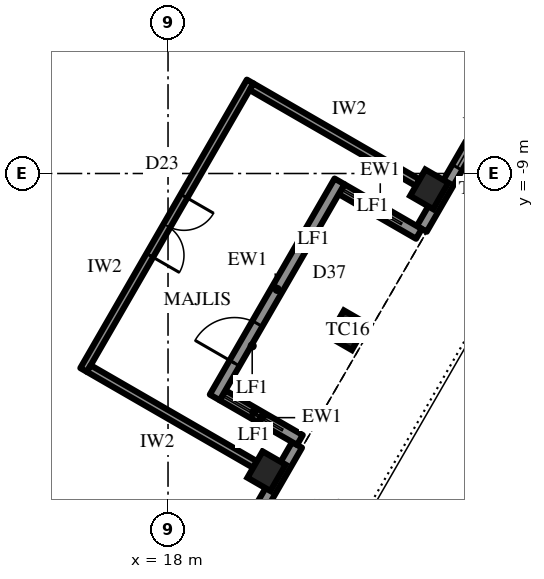
"""IFC4 building model, lengths in metres.
Left out: names, types, materials, properties, quantities, classifications, styles, units other than length and angle.
Written with IfcOpenShell. Run it as: python <this file> out.ifc"""

import sys

from ifc_helpers import new_model, si_unit, direction, frame, frame_2d, origin, origin_2d, place, context, subcontext, project, spatial, rectangle, extrude, element, fill, save


model = new_model("IFC4")
c1 = context("Model", 3, precision=1e-05, world=origin(), true_north=direction((0.0, 1.0)))
c2 = subcontext(c1, "Body", "Model", "MODEL_VIEW")
j1 = project(units=[si_unit("LENGTHUNIT", "METRE"), si_unit("PLANEANGLEUNIT", "RADIAN")], contexts=[c1])
p1 = place(None, origin())
s1 = spatial("IfcSite", under=j1, at=p1, CompositionType="ELEMENT")
p2 = place(p1, origin())
s2 = spatial("IfcBuilding", under=s1, at=p2, CompositionType="ELEMENT")
p3 = place(p2, frame((0.0, 0.0, 387.1)))
s3 = spatial("IfcBuildingStorey", under=s2, at=p3, CompositionType="ELEMENT", Elevation=387.1)
for number, where, z_axis, x_axis in (
    (1, (20.592, -16.833, 0.0), (0.0, 0.0, 1.0), (0.5, 0.866, 0.0)),
    (2, (22.733, -13.125, 0.0), (0.0, 0.0, 1.0), (0.5, 0.866, 0.0)),
    (3, (24.874, -9.417, 0.0), (0.0, 0.0, 1.0), (0.5, 0.866, 0.0)),
):
    element("IfcColumn", number, at=place(p3, frame(where, z_axis=z_axis, x_axis=x_axis)), inside=s3, PredefinedType="COLUMN", context=c2, shape_type="SweptSolid", body=[
        extrude(rectangle(XDim=0.8, YDim=0.7, at=origin_2d()), origin(), (0.0, 0.0, 1.0), 4.2),
    ])
p4 = place(p3, frame((16.613, -24.425, 0.0), z_axis=(0.0, 0.0, 1.0), x_axis=(0.499996453679, 0.866027451244, 0.0)))
e4 = element("IfcWall", 4, at=p4, inside=s3, PredefinedType="SOLIDWALL", context=c2, shape_type="SweptSolid", body=[
    extrude(rectangle(XDim=9.564, YDim=0.3, at=frame_2d((4.782, 0.0))), origin(), (0.0, 0.0, 1.0), 2.9),
])
p5 = place(p4, frame((0.866, 0.0, 0.6)))
e5 = element("IfcOpeningElement", 5, at=p5, cuts=e4, PredefinedType="OPENING", context=c2, shape_type="SweptSolid", body=[
    extrude(rectangle(XDim=2.55, YDim=2.05, at=frame_2d((1.275, 1.025))), frame((0.0, 0.16, 0.0), z_axis=(0.0, -1.0, 0.0), x_axis=(1.0, 0.0, 0.0)), (0.0, 0.0, 1.0), 0.32),
])
p6 = place(p4, frame((5.823, 0.0, 0.0)))
e6 = element("IfcOpeningElement", 6, at=p6, cuts=e4, PredefinedType="OPENING", context=c2, shape_type="SweptSolid", body=[
    extrude(rectangle(XDim=1.2, YDim=2.4, at=frame_2d((0.6, 1.2))), frame((0.0, 0.16, 0.0), z_axis=(0.0, -1.0, 0.0), x_axis=(1.0, 0.0, 0.0)), (0.0, 0.0, 1.0), 0.32),
])
p7 = place(p3, frame((24.677, -10.458, 0.0), z_axis=(0.0, 0.0, 1.0), x_axis=(0.499996453679, 0.866027451244, 0.0)))
e7 = element("IfcWall", 7, at=p7, inside=s3, PredefinedType="SOLIDWALL", context=c2, shape_type="SweptSolid", body=[
    extrude(rectangle(XDim=9.564, YDim=0.3, at=frame_2d((4.782, 0.0))), origin(), (0.0, 0.0, 1.0), 2.9),
])
p8 = place(p7, frame((1.866, 0.0, 0.6)))
e8 = element("IfcOpeningElement", 8, at=p8, cuts=e7, PredefinedType="OPENING", context=c2, shape_type="SweptSolid", body=[
    extrude(rectangle(XDim=2.55, YDim=2.05, at=frame_2d((1.275, 1.025))), frame((0.0, 0.16, 0.0), z_axis=(0.0, -1.0, 0.0), x_axis=(1.0, 0.0, 0.0)), (0.0, 0.0, 1.0), 0.32),
])
p9 = place(p7, frame((6.148, 0.0, 0.6)))
e9 = element("IfcOpeningElement", 9, at=p9, cuts=e7, PredefinedType="OPENING", context=c2, shape_type="SweptSolid", body=[
    extrude(rectangle(XDim=2.55, YDim=2.05, at=frame_2d((1.275, 1.025))), frame((0.0, 0.16, 0.0), z_axis=(0.0, -1.0, 0.0), x_axis=(1.0, 0.0, 0.0)), (0.0, 0.0, 1.0), 0.32),
])
for number, where, z_axis, x_axis in (
    (10, (21.47, -16.012, 0.0), (0.0, 0.0, 1.0), (-0.866, 0.5, 0.0)),
    (11, (24.602, -10.588, 0.0), (0.0, 0.0, 1.0), (-0.866, 0.5, 0.0)),
):
    element("IfcWall", number, at=place(p3, frame(where, z_axis=z_axis, x_axis=x_axis)), inside=s3, PredefinedType="SOLIDWALL", context=c2, shape_type="SweptSolid", body=[
        extrude(rectangle(XDim=2.35, YDim=0.3, at=frame_2d((1.175, 0.0))), origin(), (0.0, 0.0, 1.0), 2.9),
    ])
p10 = place(p3, frame((19.23, -14.892, 0.0), z_axis=(0.0, 0.0, 1.0), x_axis=(0.499999339774, 0.866025784966, 0.0)))
e12 = element("IfcWall", 12, at=p10, inside=s3, PredefinedType="SOLIDWALL", context=c2, shape_type="SweptSolid", body=[
    extrude(rectangle(XDim=6.564, YDim=0.3, at=frame_2d((3.282, 0.0))), origin(), (0.0, 0.0, 1.0), 2.9),
])
p11 = place(p10, frame((1.041, 0.0, 0.0)))
e13 = element("IfcOpeningElement", 13, at=p11, cuts=e12, PredefinedType="OPENING", context=c2, shape_type="SweptSolid", body=[
    extrude(rectangle(XDim=1.2, YDim=2.4, at=frame_2d((0.6, 1.2))), frame((0.0, 0.16, 0.0), z_axis=(0.0, -1.0, 0.0), x_axis=(1.0, 0.0, 0.0)), (0.0, 0.0, 1.0), 0.32),
])
p12 = place(p3, frame((15.779, -14.17, 0.0), z_axis=(0.0, 0.0, 1.0), x_axis=(0.500006995557, 0.86602136486, 0.0)))
e14 = element("IfcWall", 14, at=p12, inside=s3, PredefinedType="PARTITIONING", context=c2, shape_type="SweptSolid", body=[
    extrude(rectangle(XDim=8.764, YDim=0.2, at=frame_2d((4.382, 0.0))), origin(), (0.0, 0.0, 1.0), 4.0),
])
p13 = place(p12, frame((3.482, 0.0, 0.0)))
e15 = element("IfcOpeningElement", 15, at=p13, cuts=e14, PredefinedType="OPENING", context=c2, shape_type="SweptSolid", body=[
    extrude(rectangle(XDim=1.8, YDim=2.4, at=frame_2d((0.9, 1.2))), frame((0.0, 0.11, 0.0), z_axis=(0.0, -1.0, 0.0), x_axis=(1.0, 0.0, 0.0)), (0.0, 0.0, 1.0), 0.22),
])
p14 = place(p3, frame((15.916, -14.133, 0.0), z_axis=(0.0, 0.0, 1.0), x_axis=(0.866018134068, -0.500012591307, 0.0)))
e16 = element("IfcWall", 16, at=p14, inside=s3, PredefinedType="PARTITIONING", context=c2, shape_type="SweptSolid", body=[
    extrude(rectangle(XDim=5.05, YDim=0.2, at=frame_2d((2.525, 0.0))), origin(), (0.0, 0.0, 1.0), 3.082),
])
p15 = place(p3, frame((20.198, -6.717, 0.0), z_axis=(0.0, 0.0, 1.0), x_axis=(0.866006046928, -0.500033525561, 0.0)))
e17 = element("IfcWall", 17, at=p15, inside=s3, PredefinedType="PARTITIONING", context=c2, shape_type="SweptSolid", body=[
    extrude(rectangle(XDim=5.05, YDim=0.2, at=frame_2d((2.525, 0.0))), origin(), (0.0, 0.0, 1.0), 2.992),
])
p16 = place(p8, origin())
e18 = element("IfcWindow", 18, at=p16, inside=s3, PartitioningType="SINGLE_PANEL", PredefinedType="WINDOW", context=c2, shape_type="SweptSolid", body=[
    extrude(rectangle(XDim=2.55, YDim=2.05, at=frame_2d((1.275, 1.025))), frame((0.0, 0.03, 0.0), z_axis=(0.0, -1.0, 0.0), x_axis=(1.0, 0.0, 0.0)), (0.0, 0.0, 1.0), 0.06),
])
fill(e8, e18)
p17 = place(p11, origin())
e19 = element("IfcDoor", 19, at=p17, inside=s3, OperationType="SINGLE_SWING_RIGHT", PredefinedType="DOOR", context=c2, shape_type="SweptSolid", body=[
    extrude(rectangle(XDim=1.2, YDim=2.4, at=frame_2d((0.6, 1.2))), frame((0.0, 0.025, 0.0), z_axis=(0.0, -1.0, 0.0), x_axis=(1.0, 0.0, 0.0)), (0.0, 0.0, 1.0), 0.05),
])
fill(e13, e19)
p18 = place(p13, frame((1.8, 0.0, 0.0), z_axis=(0.0, 0.0, 1.0), x_axis=(-1.0, 0.0, 0.0)))
e20 = element("IfcDoor", 20, at=p18, inside=s3, OperationType="DOUBLE_DOOR_SINGLE_SWING", PredefinedType="DOOR", context=c2, shape_type="SweptSolid", body=[
    extrude(rectangle(XDim=1.8, YDim=2.4, at=frame_2d((0.9, 1.2))), frame((0.0, 0.025, 0.0), z_axis=(0.0, -1.0, 0.0), x_axis=(1.0, 0.0, 0.0)), (0.0, 0.0, 1.0), 0.05),
])
fill(e15, e20)
save(model, sys.argv[1])
